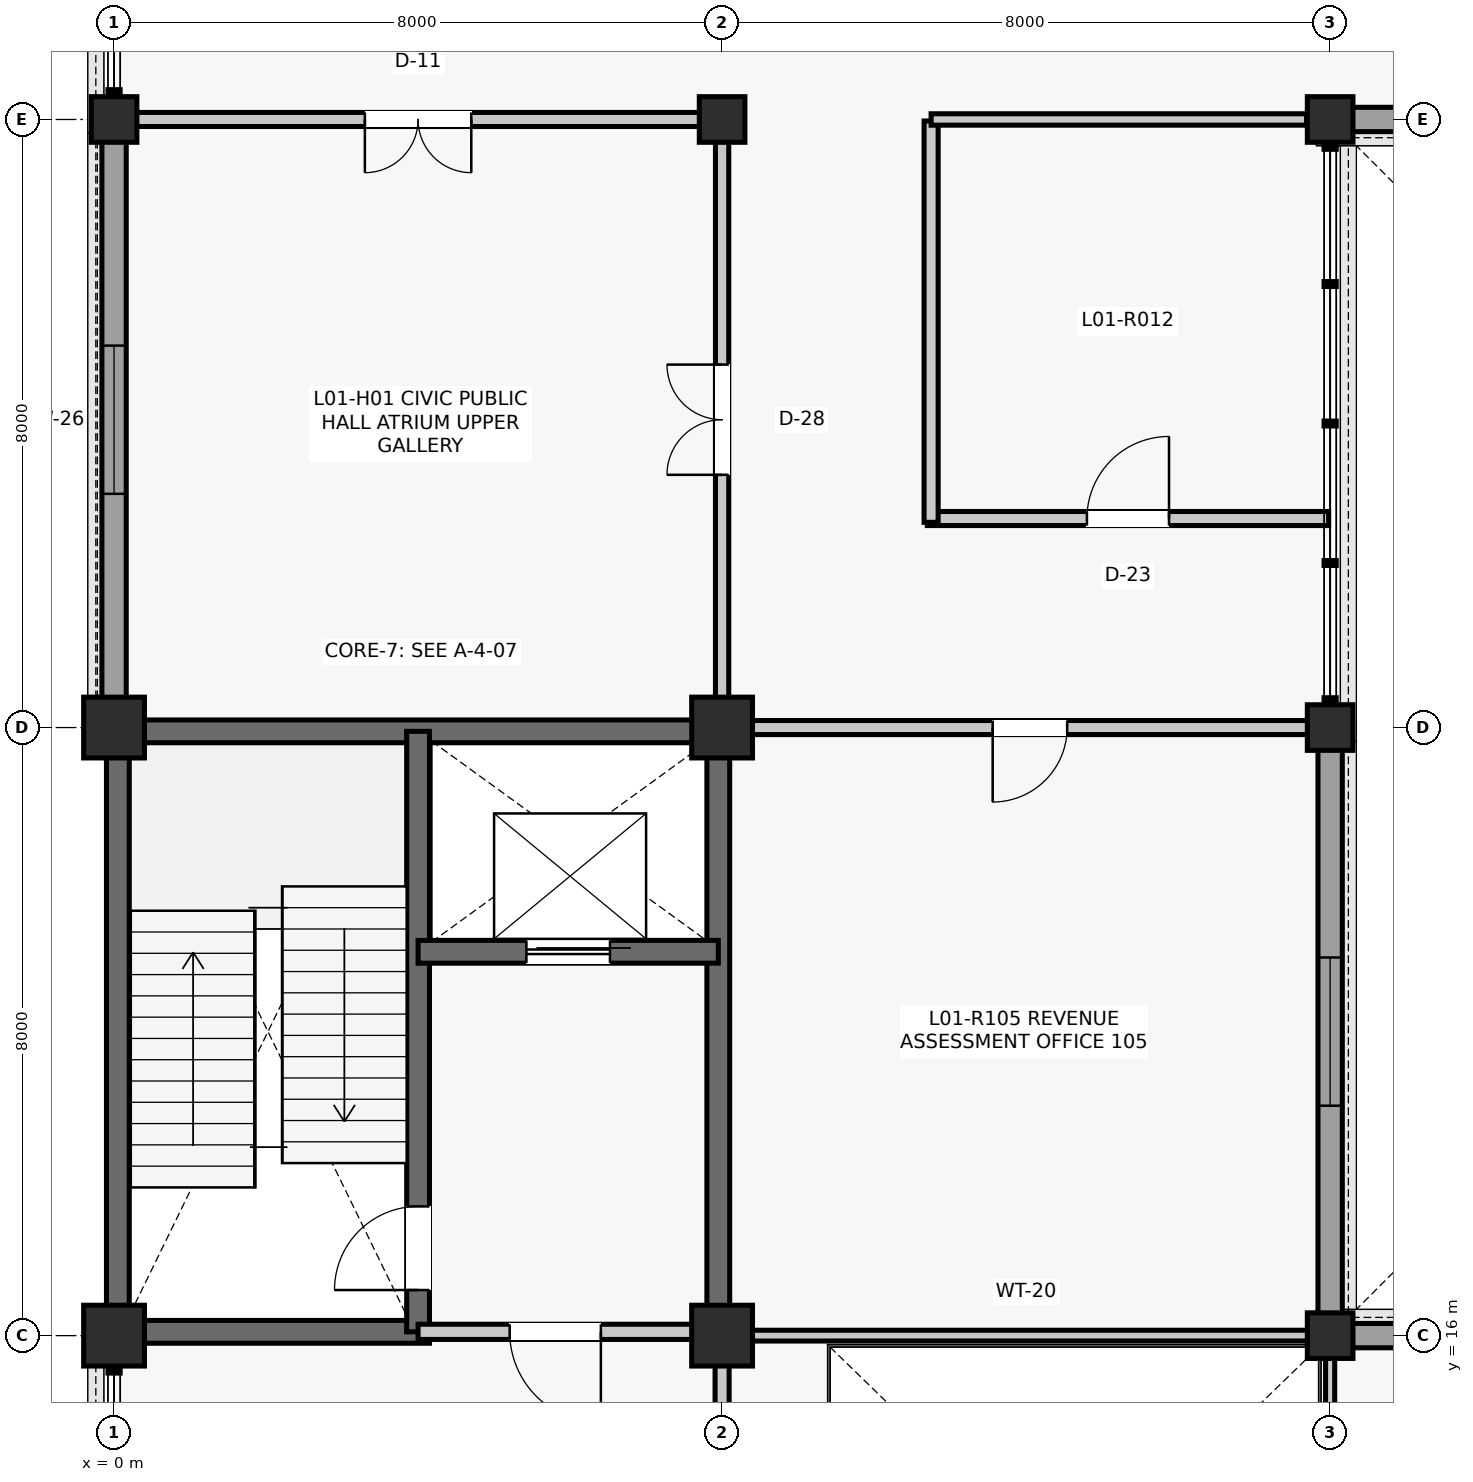
"""IFC4 building model, lengths in metres.
Left out: names, types, materials, properties, quantities, classifications, styles, units other than length and angle.
Written with IfcOpenShell. Run it as: python <this file> out.ifc"""

import sys

from ifc_helpers import new_model, si_unit, direction, frame, frame_2d, origin, origin_2d, place, context, subcontext, project, spatial, rectangle, extrude, element, fill, save


model = new_model("IFC4")
c1 = context("Model", 3, precision=1e-05, world=origin(), true_north=direction((0.0, 1.0)))
c2 = subcontext(c1, "Body", "Model", "MODEL_VIEW")
j1 = project(units=[si_unit("LENGTHUNIT", "METRE"), si_unit("PLANEANGLEUNIT", "RADIAN")], contexts=[c1])
p1 = place(None, origin())
s1 = spatial("IfcSite", under=j1, at=p1, CompositionType="ELEMENT")
p2 = place(p1, origin())
s2 = spatial("IfcBuilding", under=s1, at=p2, CompositionType="ELEMENT")
p3 = place(p2, frame((0.0, 0.0, 5.28)))
s3 = spatial("IfcBuildingStorey", under=s2, at=p3, CompositionType="ELEMENT", Elevation=5.28)
for number, where, z_axis, x_axis in (
    (1, (0.0, 16.0, 0.0), (0.0, 0.0, 1.0), (1.0, 0.0, 0.0)),
    (2, (0.0, 24.0, 0.0), (0.0, 0.0, 1.0), (1.0, 0.0, 0.0)),
):
    element("IfcColumn", number, at=place(p3, frame(where, z_axis=z_axis, x_axis=x_axis)), inside=s3, PredefinedType="COLUMN", context=c2, shape_type="SweptSolid", body=[
        extrude(rectangle(XDim=0.8, YDim=0.8, at=origin_2d()), origin(), (0.0, 0.0, 1.0), 4.62),
    ])
p4 = place(p3, frame((0.0, 32.0, 0.0), z_axis=(0.0, 0.0, 1.0), x_axis=(1.0, 0.0, 0.0)))
e3 = element("IfcColumn", 3, at=p4, inside=s3, PredefinedType="COLUMN", context=c2, shape_type="SweptSolid", body=[
    extrude(rectangle(XDim=0.6, YDim=0.6, at=origin_2d()), origin(), (0.0, 0.0, 1.0), 4.62),
])
for number, where, z_axis, x_axis in (
    (4, (8.0, 16.0, 0.0), (0.0, 0.0, 1.0), (1.0, 0.0, 0.0)),
    (5, (8.0, 24.0, 0.0), (0.0, 0.0, 1.0), (1.0, 0.0, 0.0)),
):
    element("IfcColumn", number, at=place(p3, frame(where, z_axis=z_axis, x_axis=x_axis)), inside=s3, PredefinedType="COLUMN", context=c2, shape_type="SweptSolid", body=[
        extrude(rectangle(XDim=0.8, YDim=0.8, at=origin_2d()), origin(), (0.0, 0.0, 1.0), 4.62),
    ])
for number, where, z_axis, x_axis in (
    (6, (8.0, 32.0, 0.0), (0.0, 0.0, 1.0), (1.0, 0.0, 0.0)),
    (7, (16.0, 16.0, 0.0), (0.0, 0.0, 1.0), (1.0, 0.0, 0.0)),
    (8, (16.0, 24.0, 0.0), (0.0, 0.0, 1.0), (1.0, 0.0, 0.0)),
    (9, (16.0, 32.0, 0.0), (0.0, 0.0, 1.0), (1.0, 0.0, 0.0)),
):
    element("IfcColumn", number, at=place(p3, frame(where, z_axis=z_axis, x_axis=x_axis)), inside=s3, PredefinedType="COLUMN", context=c2, shape_type="SweptSolid", body=[
        extrude(rectangle(XDim=0.6, YDim=0.6, at=origin_2d()), origin(), (0.0, 0.0, 1.0), 4.62),
    ])
p5 = place(p3, frame((0.0, 24.385, 0.0), z_axis=(0.0, 0.0, 1.0), x_axis=(0.0, 1.0, 0.0)))
e10 = element("IfcWall", 10, at=p5, inside=s3, PredefinedType="SOLIDWALL", context=c2, shape_type="SweptSolid", body=[
    extrude(rectangle(XDim=7.33, YDim=0.32, at=frame_2d((3.665, 0.0))), origin(), (0.0, 0.0, 1.0), 3.91),
])
p6 = place(p5, frame((2.69, 0.0, 0.9)))
e11 = element("IfcOpeningElement", 11, at=p6, cuts=e10, PredefinedType="OPENING", context=c2, shape_type="SweptSolid", body=[
    extrude(rectangle(XDim=1.95, YDim=2.45, at=frame_2d((0.975, 1.225))), frame((0.0, 0.17, 0.0), z_axis=(0.0, -1.0, 0.0), x_axis=(1.0, 0.0, 0.0)), (0.0, 0.0, 1.0), 0.34),
])
p7 = place(p3, frame((16.0, 16.285, 0.0), z_axis=(0.0, 0.0, 1.0), x_axis=(0.0, 1.0, 0.0)))
e12 = element("IfcWall", 12, at=p7, inside=s3, PredefinedType="SOLIDWALL", context=c2, shape_type="SweptSolid", body=[
    extrude(rectangle(XDim=7.43, YDim=0.32, at=frame_2d((3.715, 0.0))), origin(), (0.0, 0.0, 1.0), 3.974),
])
p8 = place(p7, frame((2.74, 0.0, 0.9)))
e13 = element("IfcOpeningElement", 13, at=p8, cuts=e12, PredefinedType="OPENING", context=c2, shape_type="SweptSolid", body=[
    extrude(rectangle(XDim=1.95, YDim=2.45, at=frame_2d((0.975, 1.225))), frame((0.0, 0.17, 0.0), z_axis=(0.0, -1.0, 0.0), x_axis=(1.0, 0.0, 0.0)), (0.0, 0.0, 1.0), 0.34),
])
p9 = place(p3, frame((16.285, 16.0, 0.0), z_axis=(0.0, 0.0, 1.0), x_axis=(1.0, 0.0, 0.0)))
e14 = element("IfcWall", 14, at=p9, inside=s3, PredefinedType="SOLIDWALL", context=c2, shape_type="SweptSolid", body=[
    extrude(rectangle(XDim=7.43, YDim=0.32, at=frame_2d((3.715, 0.0))), origin(), (0.0, 0.0, 1.0), 3.974),
])
p10 = place(p9, frame((2.74, 0.0, 0.9)))
e15 = element("IfcOpeningElement", 15, at=p10, cuts=e14, PredefinedType="OPENING", context=c2, shape_type="SweptSolid", body=[
    extrude(rectangle(XDim=1.95, YDim=2.45, at=frame_2d((0.975, 1.225))), frame((0.0, 0.17, 0.0), z_axis=(0.0, -1.0, 0.0), x_axis=(1.0, 0.0, 0.0)), (0.0, 0.0, 1.0), 0.34),
])
p11 = place(p3, frame((16.285, 32.0, 0.0), z_axis=(0.0, 0.0, 1.0), x_axis=(1.0, 0.0, 0.0)))
e16 = element("IfcWall", 16, at=p11, inside=s3, PredefinedType="SOLIDWALL", context=c2, shape_type="SweptSolid", body=[
    extrude(rectangle(XDim=7.43, YDim=0.32, at=frame_2d((3.715, 0.0))), origin(), (0.0, 0.0, 1.0), 4.022),
])
p12 = place(p11, frame((2.815, 0.0, 0.9)))
e17 = element("IfcOpeningElement", 17, at=p12, cuts=e16, PredefinedType="OPENING", context=c2, shape_type="SweptSolid", body=[
    extrude(rectangle(XDim=1.8, YDim=2.3, at=frame_2d((0.9, 1.15))), frame((0.0, 0.17, 0.0), z_axis=(0.0, -1.0, 0.0), x_axis=(1.0, 0.0, 0.0)), (0.0, 0.0, 1.0), 0.34),
])
for number, where, z_axis, x_axis in (
    (18, (0.05, 16.29, 0.0), (0.0, 0.0, 1.0), (0.0, 1.0, 0.0)),
    (19, (0.29, 23.95, 0.0), (0.0, 0.0, 1.0), (1.0, 0.0, 0.0)),
    (20, (7.95, 16.29, 0.0), (0.0, 0.0, 1.0), (0.0, 1.0, 0.0)),
):
    element("IfcWall", number, at=place(p3, frame(where, z_axis=z_axis, x_axis=x_axis)), inside=s3, PredefinedType="SHEAR", context=c2, shape_type="SweptSolid", body=[
        extrude(rectangle(XDim=7.42, YDim=0.3, at=frame_2d((3.71, 0.0))), origin(), (0.0, 0.0, 1.0), 4.335),
    ])
p13 = place(p3, frame((0.29, 16.05, 0.0), z_axis=(0.0, 0.0, 1.0), x_axis=(1.0, 0.0, 0.0)))
e21 = element("IfcWall", 21, at=p13, inside=s3, PredefinedType="SHEAR", context=c2, shape_type="SweptSolid", body=[
    extrude(rectangle(XDim=3.86, YDim=0.3, at=frame_2d((1.93, 0.0))), origin(), (0.0, 0.0, 1.0), 4.335),
])
p14 = place(p3, frame((4.0, 16.05, 0.0), z_axis=(0.0, 0.0, 1.0), x_axis=(0.0, 1.0, 0.0)))
e22 = element("IfcWall", 22, at=p14, inside=s3, PredefinedType="SHEAR", context=c2, shape_type="SweptSolid", body=[
    extrude(rectangle(XDim=7.9, YDim=0.3, at=frame_2d((3.95, 0.0))), origin(), (0.0, 0.0, 1.0), 4.335),
])
p15 = place(p14, frame((0.55, 0.0, 0.0)))
e23 = element("IfcOpeningElement", 23, at=p15, cuts=e22, PredefinedType="OPENING", context=c2, shape_type="SweptSolid", body=[
    extrude(rectangle(XDim=1.1, YDim=2.15, at=frame_2d((0.55, 1.075))), frame((0.0, 0.16, 0.0), z_axis=(0.0, -1.0, 0.0), x_axis=(1.0, 0.0, 0.0)), (0.0, 0.0, 1.0), 0.32),
])
p16 = place(p3, frame((4.0, 21.05, 0.0), z_axis=(0.0, 0.0, 1.0), x_axis=(1.0, 0.0, 0.0)))
e24 = element("IfcWall", 24, at=p16, inside=s3, PredefinedType="SHEAR", context=c2, shape_type="SweptSolid", body=[
    extrude(rectangle(XDim=3.95, YDim=0.3, at=frame_2d((1.975, 0.0))), origin(), (0.0, 0.0, 1.0), 4.335),
])
p17 = place(p16, frame((1.425, 0.0, 0.0)))
e25 = element("IfcOpeningElement", 25, at=p17, cuts=e24, PredefinedType="OPENING", context=c2, shape_type="SweptSolid", body=[
    extrude(rectangle(XDim=1.1, YDim=2.2, at=frame_2d((0.55, 1.1))), frame((0.0, 0.16, 0.0), z_axis=(0.0, -1.0, 0.0), x_axis=(1.0, 0.0, 0.0)), (0.0, 0.0, 1.0), 0.32),
])
p18 = place(p3, frame((4.0, 16.05, 0.0), z_axis=(0.0, 0.0, 1.0), x_axis=(1.0, 0.0, 0.0)))
e26 = element("IfcWall", 26, at=p18, inside=s3, PredefinedType="PARTITIONING", context=c2, shape_type="SweptSolid", body=[
    extrude(rectangle(XDim=3.61, YDim=0.2, at=frame_2d((1.805, 0.0))), origin(), (0.0, 0.0, 1.0), 3.771),
])
p19 = place(p18, frame((1.205, 0.0, 0.0)))
e27 = element("IfcOpeningElement", 27, at=p19, cuts=e26, PredefinedType="OPENING", context=c2, shape_type="SweptSolid", body=[
    extrude(rectangle(XDim=1.2, YDim=2.15, at=frame_2d((0.6, 1.075))), frame((0.0, 0.11, 0.0), z_axis=(0.0, -1.0, 0.0), x_axis=(1.0, 0.0, 0.0)), (0.0, 0.0, 1.0), 0.22),
])
p20 = place(p3, frame((10.7, 26.75, 0.0), z_axis=(0.0, 0.0, 1.0), x_axis=(1.0, 0.0, 0.0)))
e28 = element("IfcWall", 28, at=p20, inside=s3, PredefinedType="PARTITIONING", context=c2, shape_type="SweptSolid", body=[
    extrude(rectangle(XDim=5.28, YDim=0.185, at=frame_2d((2.64, 0.0))), origin(), (0.0, 0.0, 1.0), 3.907),
])
p21 = place(p20, frame((2.1, 0.0, 0.0)))
e29 = element("IfcOpeningElement", 29, at=p21, cuts=e28, PredefinedType="OPENING", context=c2, shape_type="SweptSolid", body=[
    extrude(rectangle(XDim=1.08, YDim=2.2, at=frame_2d((0.54, 1.1))), frame((0.0, 0.103, 0.0), z_axis=(0.0, -1.0, 0.0), x_axis=(1.0, 0.0, 0.0)), (0.0, 0.0, 1.0), 0.205),
])
p22 = place(p3, frame((10.75, 26.7, 0.0), z_axis=(0.0, 0.0, 1.0), x_axis=(0.0, 1.0, 0.0)))
e30 = element("IfcWall", 30, at=p22, inside=s3, PredefinedType="PARTITIONING", context=c2, shape_type="SweptSolid", body=[
    extrude(rectangle(XDim=5.28, YDim=0.185, at=frame_2d((2.64, 0.0))), origin(), (0.0, 0.0, 1.0), 3.787),
])
p23 = place(p3, frame((10.75, 32.0, 0.0), z_axis=(0.0, 0.0, 1.0), x_axis=(1.0, 0.0, 0.0)))
e31 = element("IfcWall", 31, at=p23, inside=s3, PredefinedType="PARTITIONING", context=c2, shape_type="SweptSolid", body=[
    extrude(rectangle(XDim=4.94, YDim=0.15, at=frame_2d((2.47, 0.0))), origin(), (0.0, 0.0, 1.0), 3.787),
])
p24 = place(p3, frame((8.0, 8.29, 0.0), z_axis=(0.0, 0.0, 1.0), x_axis=(0.0, 1.0, 0.0)))
e32 = element("IfcWall", 32, at=p24, inside=s3, PredefinedType="PARTITIONING", context=c2, shape_type="SweptSolid", body=[
    extrude(rectangle(XDim=7.32, YDim=0.185, at=frame_2d((3.66, 0.0))), origin(), (0.0, 0.0, 1.0), 3.781),
])
p25 = place(p24, frame((3.01, 0.0, 0.0)))
e33 = element("IfcOpeningElement", 33, at=p25, cuts=e32, PredefinedType="OPENING", context=c2, shape_type="SweptSolid", body=[
    extrude(rectangle(XDim=1.3, YDim=2.2, at=frame_2d((0.65, 1.1))), frame((0.0, 0.103, 0.0), z_axis=(0.0, -1.0, 0.0), x_axis=(1.0, 0.0, 0.0)), (0.0, 0.0, 1.0), 0.205),
])
p26 = place(p3, frame((8.0, 24.39, 0.0), z_axis=(0.0, 0.0, 1.0), x_axis=(0.0, 1.0, 0.0)))
e34 = element("IfcWall", 34, at=p26, inside=s3, PredefinedType="PARTITIONING", context=c2, shape_type="SweptSolid", body=[
    extrude(rectangle(XDim=7.32, YDim=0.175, at=frame_2d((3.66, 0.0))), origin(), (0.0, 0.0, 1.0), 3.787),
])
p27 = place(p26, frame((2.935, 0.0, 0.0)))
e35 = element("IfcOpeningElement", 35, at=p27, cuts=e34, PredefinedType="OPENING", context=c2, shape_type="SweptSolid", body=[
    extrude(rectangle(XDim=1.45, YDim=2.22, at=frame_2d((0.725, 1.11))), frame((0.0, 0.097, 0.0), z_axis=(0.0, -1.0, 0.0), x_axis=(1.0, 0.0, 0.0)), (0.0, 0.0, 1.0), 0.195),
])
p28 = place(p3, frame((0.29, 32.0, 0.0), z_axis=(0.0, 0.0, 1.0), x_axis=(1.0, 0.0, 0.0)))
e36 = element("IfcWall", 36, at=p28, inside=s3, PredefinedType="PARTITIONING", context=c2, shape_type="SweptSolid", body=[
    extrude(rectangle(XDim=7.42, YDim=0.185, at=frame_2d((3.71, 0.0))), origin(), (0.0, 0.0, 1.0), 3.712),
])
p29 = place(p28, frame((3.01, 0.0, 0.0)))
e37 = element("IfcOpeningElement", 37, at=p29, cuts=e36, PredefinedType="OPENING", context=c2, shape_type="SweptSolid", body=[
    extrude(rectangle(XDim=1.4, YDim=2.2, at=frame_2d((0.7, 1.1))), frame((0.0, 0.103, 0.0), z_axis=(0.0, -1.0, 0.0), x_axis=(1.0, 0.0, 0.0)), (0.0, 0.0, 1.0), 0.205),
])
p30 = place(p3, frame((16.0, 8.29, 0.0), z_axis=(0.0, 0.0, 1.0), x_axis=(0.0, 1.0, 0.0)))
e38 = element("IfcWall", 38, at=p30, inside=s3, PredefinedType="PARTITIONING", context=c2, shape_type="SweptSolid", body=[
    extrude(rectangle(XDim=7.42, YDim=0.12, at=frame_2d((3.71, 0.0))), origin(), (0.0, 0.0, 1.0), 3.851),
])
p31 = place(p3, frame((8.39, 16.0, 0.0), z_axis=(0.0, 0.0, 1.0), x_axis=(1.0, 0.0, 0.0)))
e39 = element("IfcWall", 39, at=p31, inside=s3, PredefinedType="PARTITIONING", context=c2, shape_type="SweptSolid", body=[
    extrude(rectangle(XDim=7.32, YDim=0.142, at=frame_2d((3.66, 0.0))), origin(), (0.0, 0.0, 1.0), 3.781),
])
p32 = place(p3, frame((8.39, 24.0, 0.0), z_axis=(0.0, 0.0, 1.0), x_axis=(1.0, 0.0, 0.0)))
e40 = element("IfcWall", 40, at=p32, inside=s3, PredefinedType="PARTITIONING", context=c2, shape_type="SweptSolid", body=[
    extrude(rectangle(XDim=7.32, YDim=0.185, at=frame_2d((3.66, 0.0))), origin(), (0.0, 0.0, 1.0), 3.712),
])
p33 = place(p32, frame((3.17, 0.0, 0.0)))
e41 = element("IfcOpeningElement", 41, at=p33, cuts=e40, PredefinedType="OPENING", context=c2, shape_type="SweptSolid", body=[
    extrude(rectangle(XDim=0.98, YDim=2.15, at=frame_2d((0.49, 1.075))), frame((0.0, 0.103, 0.0), z_axis=(0.0, -1.0, 0.0), x_axis=(1.0, 0.0, 0.0)), (0.0, 0.0, 1.0), 0.205),
])
p34 = place(p6, origin())
e42 = element("IfcWindow", 42, at=p34, inside=s3, PartitioningType="SINGLE_PANEL", PredefinedType="WINDOW", context=c2, shape_type="SweptSolid", body=[
    extrude(rectangle(XDim=1.95, YDim=2.45, at=frame_2d((0.975, 1.225))), frame((0.0, 0.03, 0.0), z_axis=(0.0, -1.0, 0.0), x_axis=(1.0, 0.0, 0.0)), (0.0, 0.0, 1.0), 0.06),
])
fill(e11, e42)
p35 = place(p8, origin())
e43 = element("IfcWindow", 43, at=p35, inside=s3, PartitioningType="SINGLE_PANEL", PredefinedType="WINDOW", context=c2, shape_type="SweptSolid", body=[
    extrude(rectangle(XDim=1.95, YDim=2.45, at=frame_2d((0.975, 1.225))), frame((0.0, 0.03, 0.0), z_axis=(0.0, -1.0, 0.0), x_axis=(1.0, 0.0, 0.0)), (0.0, 0.0, 1.0), 0.06),
])
fill(e13, e43)
p36 = place(p15, origin())
e44 = element("IfcDoor", 44, at=p36, inside=s3, OperationType="SINGLE_SWING_LEFT", PredefinedType="DOOR", context=c2, shape_type="SweptSolid", body=[
    extrude(rectangle(XDim=1.1, YDim=2.15, at=frame_2d((0.55, 1.075))), frame((0.0, 0.025, 0.0), z_axis=(0.0, -1.0, 0.0), x_axis=(1.0, 0.0, 0.0)), (0.0, 0.0, 1.0), 0.05),
])
fill(e23, e44)
p37 = place(p17, origin())
e45 = element("IfcDoor", 45, at=p37, inside=s3, OperationType="SLIDING_TO_LEFT", PredefinedType="DOOR", context=c2, shape_type="SweptSolid", body=[
    extrude(rectangle(XDim=1.1, YDim=2.2, at=frame_2d((0.55, 1.1))), frame((0.0, 0.025, 0.0), z_axis=(0.0, -1.0, 0.0), x_axis=(1.0, 0.0, 0.0)), (0.0, 0.0, 1.0), 0.05),
])
fill(e25, e45)
p38 = place(p19, frame((1.2, 0.0, 0.0), z_axis=(0.0, 0.0, 1.0), x_axis=(-1.0, 0.0, 0.0)))
e46 = element("IfcDoor", 46, at=p38, inside=s3, OperationType="SINGLE_SWING_RIGHT", PredefinedType="DOOR", context=c2, shape_type="SweptSolid", body=[
    extrude(rectangle(XDim=1.2, YDim=2.15, at=frame_2d((0.6, 1.075))), frame((0.0, 0.025, 0.0), z_axis=(0.0, -1.0, 0.0), x_axis=(1.0, 0.0, 0.0)), (0.0, 0.0, 1.0), 0.05),
])
fill(e27, e46)
p39 = place(p21, origin())
e47 = element("IfcDoor", 47, at=p39, inside=s3, OperationType="SINGLE_SWING_RIGHT", PredefinedType="DOOR", context=c2, shape_type="SweptSolid", body=[
    extrude(rectangle(XDim=1.08, YDim=2.2, at=frame_2d((0.54, 1.1))), frame((0.0, 0.025, 0.0), z_axis=(0.0, -1.0, 0.0), x_axis=(1.0, 0.0, 0.0)), (0.0, 0.0, 1.0), 0.05),
])
fill(e29, e47)
p40 = place(p27, origin())
e48 = element("IfcDoor", 48, at=p40, inside=s3, OperationType="DOUBLE_DOOR_SINGLE_SWING", PredefinedType="DOOR", context=c2, shape_type="SweptSolid", body=[
    extrude(rectangle(XDim=1.45, YDim=2.22, at=frame_2d((0.725, 1.11))), frame((0.0, 0.025, 0.0), z_axis=(0.0, -1.0, 0.0), x_axis=(1.0, 0.0, 0.0)), (0.0, 0.0, 1.0), 0.05),
])
fill(e35, e48)
p41 = place(p29, frame((1.4, 0.0, 0.0), z_axis=(0.0, 0.0, 1.0), x_axis=(-1.0, 0.0, 0.0)))
e49 = element("IfcDoor", 49, at=p41, inside=s3, OperationType="DOUBLE_DOOR_SINGLE_SWING", PredefinedType="DOOR", context=c2, shape_type="SweptSolid", body=[
    extrude(rectangle(XDim=1.4, YDim=2.2, at=frame_2d((0.7, 1.1))), frame((0.0, 0.025, 0.0), z_axis=(0.0, -1.0, 0.0), x_axis=(1.0, 0.0, 0.0)), (0.0, 0.0, 1.0), 0.05),
])
fill(e37, e49)
p42 = place(p33, frame((0.98, 0.0, 0.0), z_axis=(0.0, 0.0, 1.0), x_axis=(-1.0, 0.0, 0.0)))
e50 = element("IfcDoor", 50, at=p42, inside=s3, OperationType="SINGLE_SWING_LEFT", PredefinedType="DOOR", context=c2, shape_type="SweptSolid", body=[
    extrude(rectangle(XDim=0.98, YDim=2.15, at=frame_2d((0.49, 1.075))), frame((0.0, 0.025, 0.0), z_axis=(0.0, -1.0, 0.0), x_axis=(1.0, 0.0, 0.0)), (0.0, 0.0, 1.0), 0.05),
])
fill(e41, e50)
save(model, sys.argv[1])
